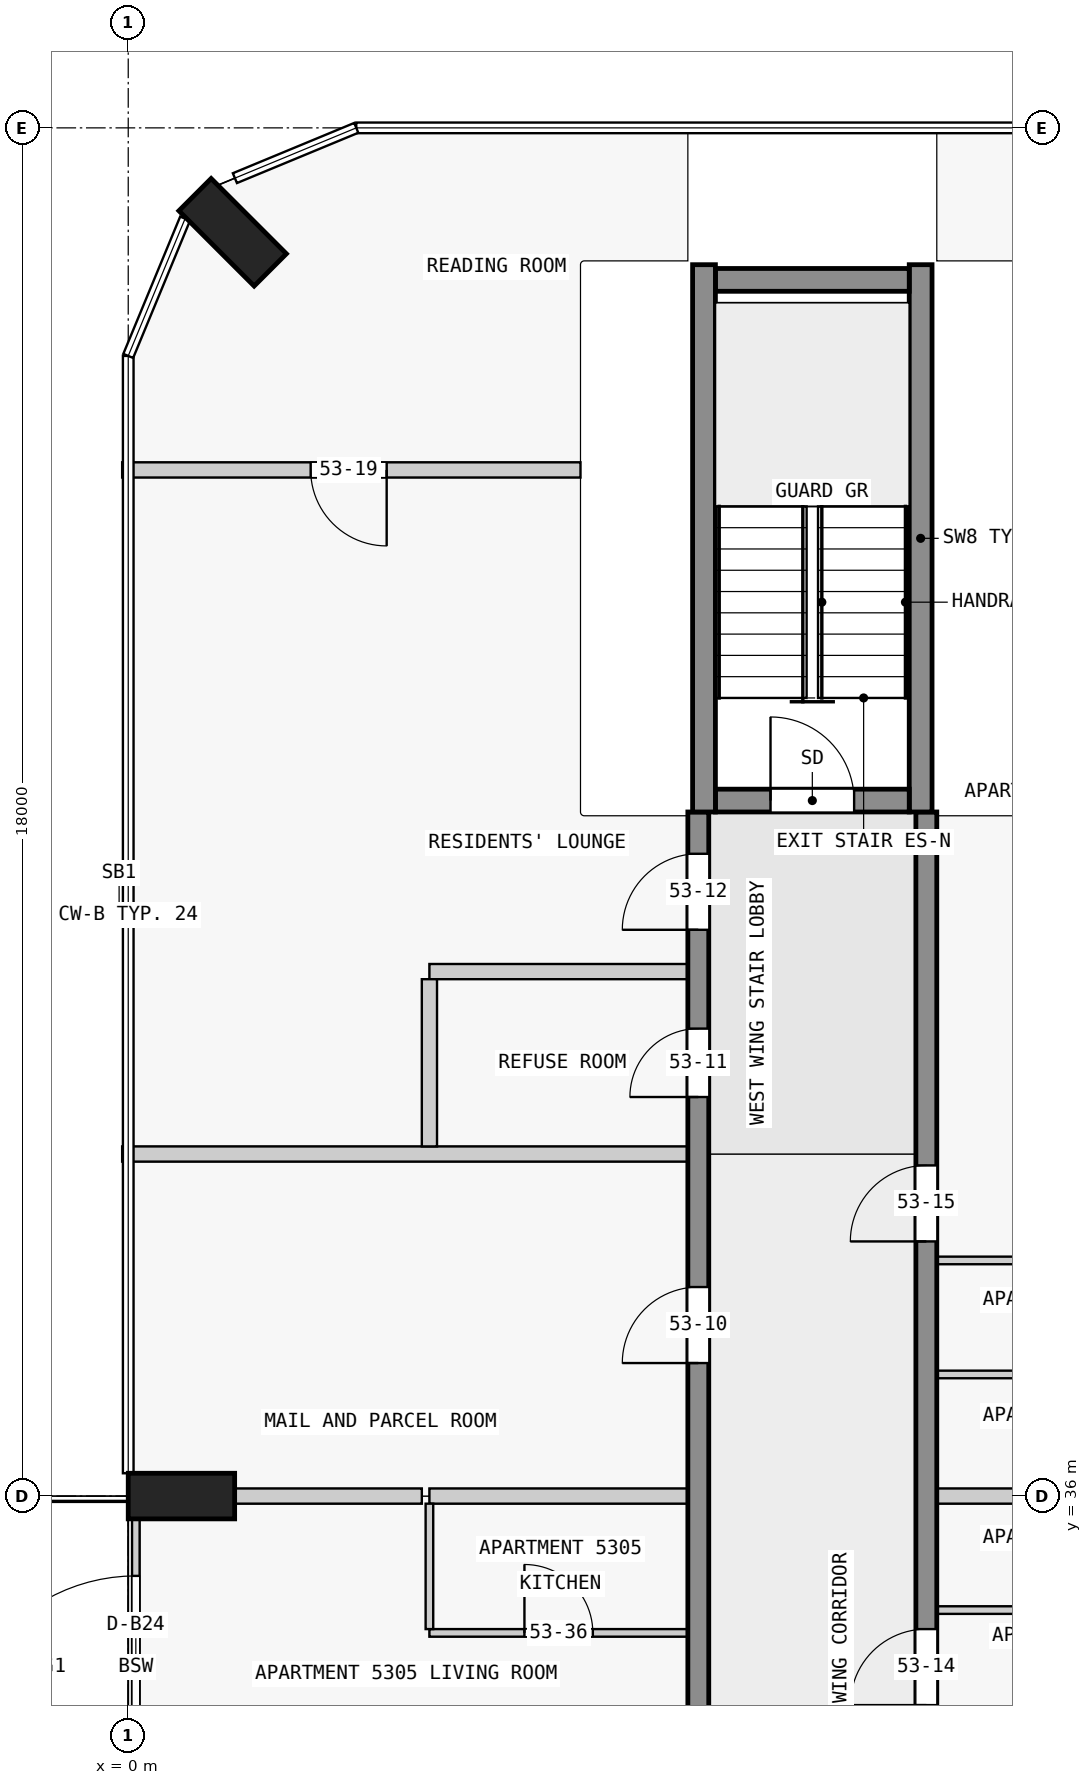
"""IFC4 building model, lengths in metres.
Left out: names, types, materials, properties, quantities, classifications, styles, units other than length and angle.
Written with IfcOpenShell. Run it as: python <this file> out.ifc"""

import sys

from ifc_helpers import new_model, si_unit, direction, frame, frame_2d, origin, origin_2d, place, context, subcontext, project, spatial, rectangle, extrude, element, fill, save


model = new_model("IFC4")
c1 = context("Model", 3, precision=1e-05, world=origin(), true_north=direction((0.0, 1.0)))
c2 = subcontext(c1, "Body", "Model", "MODEL_VIEW")
j1 = project(units=[si_unit("LENGTHUNIT", "METRE"), si_unit("PLANEANGLEUNIT", "RADIAN")], contexts=[c1])
p1 = place(None, origin())
s1 = spatial("IfcSite", under=j1, at=p1, CompositionType="ELEMENT")
p2 = place(p1, origin())
s2 = spatial("IfcBuilding", under=s1, at=p2, CompositionType="ELEMENT")
p3 = place(p2, frame((0.0, 0.0, 204.9)))
s3 = spatial("IfcBuildingStorey", under=s2, at=p3, CompositionType="ELEMENT", Elevation=204.9)
for number, where, z_axis, x_axis in (
    (1, (1.374, 52.626, 0.0), (0.0, 0.0, 1.0), (0.707, 0.707, 0.0)),
    (2, (0.7, 36.0, 0.0), (0.0, 0.0, 1.0), (0.0, 1.0, 0.0)),
):
    element("IfcColumn", number, at=place(p3, frame(where, z_axis=z_axis, x_axis=x_axis)), inside=s3, PredefinedType="COLUMN", context=c2, shape_type="SweptSolid", body=[
        extrude(rectangle(XDim=0.6, YDim=1.4, at=origin_2d()), origin(), (0.0, 0.0, 1.0), 3.5),
    ])
p4 = place(p3, frame((7.725, 45.15, 0.0), z_axis=(0.0, 0.0, 1.0), x_axis=(1.0, 0.0, 0.0)))
e3 = element("IfcWall", 3, at=p4, inside=s3, PredefinedType="SHEAR", context=c2, shape_type="SweptSolid", body=[
    extrude(rectangle(XDim=2.55, YDim=0.3, at=frame_2d((1.275, 0.0))), origin(), (0.0, 0.0, 1.0), 3.5),
])
p5 = place(p4, frame((0.725, 0.0, 0.0)))
e4 = element("IfcOpeningElement", 4, at=p5, cuts=e3, PredefinedType="OPENING", context=c2, shape_type="SweptSolid", body=[
    extrude(rectangle(XDim=1.1, YDim=2.1, at=frame_2d((0.55, 1.05))), frame((0.0, 0.16, 0.0), z_axis=(0.0, -1.0, 0.0), x_axis=(1.0, 0.0, 0.0)), (0.0, 0.0, 1.0), 0.32),
])
p6 = place(p3, frame((7.725, 52.0, 0.0), z_axis=(0.0, 0.0, 1.0), x_axis=(1.0, 0.0, 0.0)))
e5 = element("IfcWall", 5, at=p6, inside=s3, PredefinedType="SHEAR", context=c2, shape_type="SweptSolid", body=[
    extrude(rectangle(XDim=2.55, YDim=0.3, at=frame_2d((1.275, 0.0))), origin(), (0.0, 0.0, 1.0), 3.5),
])
for number, where, z_axis, x_axis in (
    (6, (7.575, 45.0, 0.0), (0.0, 0.0, 1.0), (0.0, 1.0, 0.0)),
    (7, (10.425, 45.0, 0.0), (0.0, 0.0, 1.0), (0.0, 1.0, 0.0)),
):
    element("IfcWall", number, at=place(p3, frame(where, z_axis=z_axis, x_axis=x_axis)), inside=s3, PredefinedType="SHEAR", context=c2, shape_type="SweptSolid", body=[
        extrude(rectangle(XDim=7.2, YDim=0.3, at=frame_2d((3.6, 0.0))), origin(), (0.0, 0.0, 1.0), 3.5),
    ])
p7 = place(p3, frame((7.5, 18.0, 0.0), z_axis=(0.0, 0.0, 1.0), x_axis=(0.0, 1.0, 0.0)))
e8 = element("IfcWall", 8, at=p7, inside=s3, PredefinedType="SHEAR", context=c2, shape_type="SweptSolid", body=[
    extrude(rectangle(XDim=27.0, YDim=0.275, at=frame_2d((13.5, 0.0))), origin(), (0.0, 0.0, 1.0), 3.25),
])
p8 = place(p7, frame((1.75, 0.0, 0.0)))
e9 = element("IfcOpeningElement", 9, at=p8, cuts=e8, PredefinedType="OPENING", context=c2, shape_type="SweptSolid", body=[
    extrude(rectangle(XDim=1.0, YDim=2.1, at=frame_2d((0.5, 1.05))), frame((0.0, 0.147, 0.0), z_axis=(0.0, -1.0, 0.0), x_axis=(1.0, 0.0, 0.0)), (0.0, 0.0, 1.0), 0.295),
])
p9 = place(p7, frame((5.85, 0.0, 0.0)))
e10 = element("IfcOpeningElement", 10, at=p9, cuts=e8, PredefinedType="OPENING", context=c2, shape_type="SweptSolid", body=[
    extrude(rectangle(XDim=1.8, YDim=2.1, at=frame_2d((0.9, 1.05))), frame((0.0, 0.147, 0.0), z_axis=(0.0, -1.0, 0.0), x_axis=(1.0, 0.0, 0.0)), (0.0, 0.0, 1.0), 0.295),
])
p10 = place(p7, frame((13.05, 0.0, 0.0)))
e11 = element("IfcOpeningElement", 11, at=p10, cuts=e8, PredefinedType="OPENING", context=c2, shape_type="SweptSolid", body=[
    extrude(rectangle(XDim=1.0, YDim=2.1, at=frame_2d((0.5, 1.05))), frame((0.0, 0.147, 0.0), z_axis=(0.0, -1.0, 0.0), x_axis=(1.0, 0.0, 0.0)), (0.0, 0.0, 1.0), 0.295),
])
p11 = place(p7, frame((19.75, 0.0, 0.0)))
e12 = element("IfcOpeningElement", 12, at=p11, cuts=e8, PredefinedType="OPENING", context=c2, shape_type="SweptSolid", body=[
    extrude(rectangle(XDim=1.0, YDim=2.1, at=frame_2d((0.5, 1.05))), frame((0.0, 0.147, 0.0), z_axis=(0.0, -1.0, 0.0), x_axis=(1.0, 0.0, 0.0)), (0.0, 0.0, 1.0), 0.295),
])
p12 = place(p7, frame((23.25, 0.0, 0.0)))
e13 = element("IfcOpeningElement", 13, at=p12, cuts=e8, PredefinedType="OPENING", context=c2, shape_type="SweptSolid", body=[
    extrude(rectangle(XDim=0.9, YDim=2.1, at=frame_2d((0.45, 1.05))), frame((0.0, 0.147, 0.0), z_axis=(0.0, -1.0, 0.0), x_axis=(1.0, 0.0, 0.0)), (0.0, 0.0, 1.0), 0.295),
])
p13 = place(p7, frame((25.45, 0.0, 0.0)))
e14 = element("IfcOpeningElement", 14, at=p13, cuts=e8, PredefinedType="OPENING", context=c2, shape_type="SweptSolid", body=[
    extrude(rectangle(XDim=1.0, YDim=2.1, at=frame_2d((0.5, 1.05))), frame((0.0, 0.147, 0.0), z_axis=(0.0, -1.0, 0.0), x_axis=(1.0, 0.0, 0.0)), (0.0, 0.0, 1.0), 0.295),
])
p14 = place(p3, frame((10.5, 18.0, 0.0), z_axis=(0.0, 0.0, 1.0), x_axis=(0.0, 1.0, 0.0)))
e15 = element("IfcWall", 15, at=p14, inside=s3, PredefinedType="SHEAR", context=c2, shape_type="SweptSolid", body=[
    extrude(rectangle(XDim=27.0, YDim=0.275, at=frame_2d((13.5, 0.0))), origin(), (0.0, 0.0, 1.0), 3.25),
])
p15 = place(p14, frame((4.85, 0.0, 0.0)))
e16 = element("IfcOpeningElement", 16, at=p15, cuts=e15, PredefinedType="OPENING", context=c2, shape_type="SweptSolid", body=[
    extrude(rectangle(XDim=1.0, YDim=2.1, at=frame_2d((0.5, 1.05))), frame((0.0, 0.147, 0.0), z_axis=(0.0, -1.0, 0.0), x_axis=(1.0, 0.0, 0.0)), (0.0, 0.0, 1.0), 0.295),
])
p16 = place(p14, frame((15.25, 0.0, 0.0)))
e17 = element("IfcOpeningElement", 17, at=p16, cuts=e15, PredefinedType="OPENING", context=c2, shape_type="SweptSolid", body=[
    extrude(rectangle(XDim=1.0, YDim=2.1, at=frame_2d((0.5, 1.05))), frame((0.0, 0.147, 0.0), z_axis=(0.0, -1.0, 0.0), x_axis=(1.0, 0.0, 0.0)), (0.0, 0.0, 1.0), 0.295),
])
p17 = place(p14, frame((21.35, 0.0, 0.0)))
e18 = element("IfcOpeningElement", 18, at=p17, cuts=e15, PredefinedType="OPENING", context=c2, shape_type="SweptSolid", body=[
    extrude(rectangle(XDim=1.0, YDim=2.1, at=frame_2d((0.5, 1.05))), frame((0.0, 0.147, 0.0), z_axis=(0.0, -1.0, 0.0), x_axis=(1.0, 0.0, 0.0)), (0.0, 0.0, 1.0), 0.295),
])
p18 = place(p3, frame((0.1, 31.5, 0.0), z_axis=(0.0, 0.0, 1.0), x_axis=(0.0, 1.0, 0.0)))
e19 = element("IfcWall", 19, at=p18, inside=s3, PredefinedType="STANDARD", context=c2, shape_type="SweptSolid", body=[
    extrude(rectangle(XDim=4.5, YDim=0.1, at=frame_2d((2.25, 0.0))), origin(), (0.0, 0.0, 1.0), 3.25),
])
p19 = place(p18, frame((1.05, 0.0, 0.0)))
e20 = element("IfcOpeningElement", 20, at=p19, cuts=e19, PredefinedType="OPENING", context=c2, shape_type="SweptSolid", body=[
    extrude(rectangle(XDim=2.4, YDim=2.4, at=frame_2d((1.2, 1.2))), frame((0.0, 0.06, 0.0), z_axis=(0.0, -1.0, 0.0), x_axis=(1.0, 0.0, 0.0)), (0.0, 0.0, 1.0), 0.12),
])
p20 = place(p3, frame((3.962, 34.2, 0.0), z_axis=(0.0, 0.0, 1.0), x_axis=(1.0, 0.0, 0.0)))
e21 = element("IfcWall", 21, at=p20, inside=s3, PredefinedType="PARTITIONING", context=c2, shape_type="SweptSolid", body=[
    extrude(rectangle(XDim=3.4, YDim=0.1, at=frame_2d((1.7, 0.0))), origin(), (0.0, 0.0, 1.0), 3.25),
])
p21 = place(p20, frame((1.25, 0.0, 0.0)))
e22 = element("IfcOpeningElement", 22, at=p21, cuts=e21, PredefinedType="OPENING", context=c2, shape_type="SweptSolid", body=[
    extrude(rectangle(XDim=0.9, YDim=2.1, at=frame_2d((0.45, 1.05))), frame((0.0, 0.06, 0.0), z_axis=(0.0, -1.0, 0.0), x_axis=(1.0, 0.0, 0.0)), (0.0, 0.0, 1.0), 0.12),
])
p22 = place(p3, frame((10.637, 34.5, 0.0), z_axis=(0.0, 0.0, 1.0), x_axis=(1.0, 0.0, 0.0)))
e23 = element("IfcWall", 23, at=p22, inside=s3, PredefinedType="PARTITIONING", context=c2, shape_type="SweptSolid", body=[
    extrude(rectangle(XDim=3.35, YDim=0.1, at=frame_2d((1.675, 0.0))), origin(), (0.0, 0.0, 1.0), 3.25),
])
p23 = place(p22, frame((1.25, 0.0, 0.0)))
e24 = element("IfcOpeningElement", 24, at=p23, cuts=e23, PredefinedType="OPENING", context=c2, shape_type="SweptSolid", body=[
    extrude(rectangle(XDim=0.9, YDim=2.1, at=frame_2d((0.45, 1.05))), frame((0.0, 0.06, 0.0), z_axis=(0.0, -1.0, 0.0), x_axis=(1.0, 0.0, 0.0)), (0.0, 0.0, 1.0), 0.12),
])
for number, where, z_axis, x_axis in (
    (25, (7.363, 36.0, 0.0), (0.0, 0.0, 1.0), (-1.0, 0.0, 0.0)),
    (26, (14.038, 36.0, 0.0), (0.0, 0.0, 1.0), (-1.0, 0.0, 0.0)),
):
    element("IfcWall", number, at=place(p3, frame(where, z_axis=z_axis, x_axis=x_axis)), inside=s3, PredefinedType="PARTITIONING", context=c2, shape_type="SweptSolid", body=[
        extrude(rectangle(XDim=3.4, YDim=0.2, at=frame_2d((1.7, 0.0))), origin(), (0.0, 0.0, 1.0), 3.25),
    ])
p24 = place(p3, frame((1.4, 36.0, 0.0), z_axis=(0.0, 0.0, 1.0), x_axis=(1.0, 0.0, 0.0)))
e27 = element("IfcWall", 27, at=p24, inside=s3, PredefinedType="PARTITIONING", context=c2, shape_type="SweptSolid", body=[
    extrude(rectangle(XDim=2.463, YDim=0.2, at=frame_2d((1.231, 0.0))), origin(), (0.0, 0.0, 1.0), 3.25),
])
p25 = place(p3, frame((13.988, 37.6, 0.0), z_axis=(0.0, 0.0, 1.0), x_axis=(-1.0, 0.0, 0.0)))
e28 = element("IfcWall", 28, at=p25, inside=s3, PredefinedType="PARTITIONING", context=c2, shape_type="SweptSolid", body=[
    extrude(rectangle(XDim=3.35, YDim=0.1, at=frame_2d((1.675, 0.0))), origin(), (0.0, 0.0, 1.0), 3.25),
])
p26 = place(p3, frame((13.988, 39.1, 0.0), z_axis=(0.0, 0.0, 1.0), x_axis=(-1.0, 0.0, 0.0)))
e29 = element("IfcWall", 29, at=p26, inside=s3, PredefinedType="PARTITIONING", context=c2, shape_type="SweptSolid", body=[
    extrude(rectangle(XDim=3.35, YDim=0.1, at=frame_2d((1.675, 0.0))), origin(), (0.0, 0.0, 1.0), 3.25),
])
p27 = place(p26, frame((1.25, 0.0, 0.0)))
e30 = element("IfcOpeningElement", 30, at=p27, cuts=e29, PredefinedType="OPENING", context=c2, shape_type="SweptSolid", body=[
    extrude(rectangle(XDim=0.9, YDim=2.1, at=frame_2d((0.45, 1.05))), frame((0.0, 0.06, 0.0), z_axis=(0.0, -1.0, 0.0), x_axis=(1.0, 0.0, 0.0)), (0.0, 0.0, 1.0), 0.12),
])
p28 = place(p3, frame((7.363, 40.5, 0.0), z_axis=(0.0, 0.0, 1.0), x_axis=(-1.0, 0.0, 0.0)))
e31 = element("IfcWall", 31, at=p28, inside=s3, PredefinedType="PARTITIONING", context=c2, shape_type="SweptSolid", body=[
    extrude(rectangle(XDim=7.443, YDim=0.2, at=frame_2d((3.721, 0.0))), origin(), (0.0, 0.0, 1.0), 3.25),
])
p29 = place(p3, frame((7.363, 42.9, 0.0), z_axis=(0.0, 0.0, 1.0), x_axis=(-1.0, 0.0, 0.0)))
e32 = element("IfcWall", 32, at=p29, inside=s3, PredefinedType="PARTITIONING", context=c2, shape_type="SweptSolid", body=[
    extrude(rectangle(XDim=3.4, YDim=0.2, at=frame_2d((1.7, 0.0))), origin(), (0.0, 0.0, 1.0), 3.25),
])
p30 = place(p3, frame((5.95, 49.5, 0.0), z_axis=(0.0, 0.0, 1.0), x_axis=(-1.0, 0.0, 0.0)))
e33 = element("IfcWall", 33, at=p30, inside=s3, PredefinedType="PARTITIONING", context=c2, shape_type="SweptSolid", body=[
    extrude(rectangle(XDim=6.03, YDim=0.2, at=frame_2d((3.015, 0.0))), origin(), (0.0, 0.0, 1.0), 3.25),
])
p31 = place(p30, frame((2.55, 0.0, 0.0)))
e34 = element("IfcOpeningElement", 34, at=p31, cuts=e33, PredefinedType="OPENING", context=c2, shape_type="SweptSolid", body=[
    extrude(rectangle(XDim=1.0, YDim=2.1, at=frame_2d((0.5, 1.05))), frame((0.0, 0.11, 0.0), z_axis=(0.0, -1.0, 0.0), x_axis=(1.0, 0.0, 0.0)), (0.0, 0.0, 1.0), 0.22),
])
p32 = place(p3, frame((3.962, 35.9, 0.0), z_axis=(0.0, 0.0, 1.0), x_axis=(0.0, -1.0, 0.0)))
e35 = element("IfcWall", 35, at=p32, inside=s3, PredefinedType="PARTITIONING", context=c2, shape_type="SweptSolid", body=[
    extrude(rectangle(XDim=1.65, YDim=0.1, at=frame_2d((0.825, 0.0))), origin(), (0.0, 0.0, 1.0), 3.25),
])
p33 = place(p3, frame((3.962, 42.8, 0.0), z_axis=(0.0, 0.0, 1.0), x_axis=(0.0, -1.0, 0.0)))
e36 = element("IfcWall", 36, at=p33, inside=s3, PredefinedType="PARTITIONING", context=c2, shape_type="SweptSolid", body=[
    extrude(rectangle(XDim=2.2, YDim=0.2, at=frame_2d((1.1, 0.0))), origin(), (0.0, 0.0, 1.0), 3.25),
])
p34 = place(p19, origin())
e37 = element("IfcDoor", 37, at=p34, inside=s3, OperationType="SINGLE_SWING_LEFT", PredefinedType="DOOR", context=c2, shape_type="SweptSolid", body=[
    extrude(rectangle(XDim=2.4, YDim=2.4, at=frame_2d((1.2, 1.2))), frame((0.0, 0.025, 0.0), z_axis=(0.0, -1.0, 0.0), x_axis=(1.0, 0.0, 0.0)), (0.0, 0.0, 1.0), 0.05),
])
fill(e20, e37)
p35 = place(p5, origin())
e38 = element("IfcDoor", 38, at=p35, inside=s3, OperationType="SINGLE_SWING_LEFT", PredefinedType="DOOR", context=c2, shape_type="SweptSolid", body=[
    extrude(rectangle(XDim=1.1, YDim=2.1, at=frame_2d((0.55, 1.05))), frame((0.0, 0.025, 0.0), z_axis=(0.0, -1.0, 0.0), x_axis=(1.0, 0.0, 0.0)), (0.0, 0.0, 1.0), 0.05),
])
fill(e4, e38)
p36 = place(p11, origin())
e39 = element("IfcDoor", 39, at=p36, inside=s3, OperationType="SINGLE_SWING_RIGHT", PredefinedType="DOOR", context=c2, shape_type="SweptSolid", body=[
    extrude(rectangle(XDim=1.0, YDim=2.1, at=frame_2d((0.5, 1.05))), frame((0.0, 0.025, 0.0), z_axis=(0.0, -1.0, 0.0), x_axis=(1.0, 0.0, 0.0)), (0.0, 0.0, 1.0), 0.05),
])
fill(e12, e39)
p37 = place(p12, origin())
e40 = element("IfcDoor", 40, at=p37, inside=s3, OperationType="SINGLE_SWING_RIGHT", PredefinedType="DOOR", context=c2, shape_type="SweptSolid", body=[
    extrude(rectangle(XDim=0.9, YDim=2.1, at=frame_2d((0.45, 1.05))), frame((0.0, 0.025, 0.0), z_axis=(0.0, -1.0, 0.0), x_axis=(1.0, 0.0, 0.0)), (0.0, 0.0, 1.0), 0.05),
])
fill(e13, e40)
p38 = place(p13, origin())
e41 = element("IfcDoor", 41, at=p38, inside=s3, OperationType="SINGLE_SWING_RIGHT", PredefinedType="DOOR", context=c2, shape_type="SweptSolid", body=[
    extrude(rectangle(XDim=1.0, YDim=2.1, at=frame_2d((0.5, 1.05))), frame((0.0, 0.025, 0.0), z_axis=(0.0, -1.0, 0.0), x_axis=(1.0, 0.0, 0.0)), (0.0, 0.0, 1.0), 0.05),
])
fill(e14, e41)
p39 = place(p16, origin())
e42 = element("IfcDoor", 42, at=p39, inside=s3, OperationType="SINGLE_SWING_RIGHT", PredefinedType="DOOR", context=c2, shape_type="SweptSolid", body=[
    extrude(rectangle(XDim=1.0, YDim=2.1, at=frame_2d((0.5, 1.05))), frame((0.0, 0.025, 0.0), z_axis=(0.0, -1.0, 0.0), x_axis=(1.0, 0.0, 0.0)), (0.0, 0.0, 1.0), 0.05),
])
fill(e17, e42)
p40 = place(p17, origin())
e43 = element("IfcDoor", 43, at=p40, inside=s3, OperationType="SINGLE_SWING_RIGHT", PredefinedType="DOOR", context=c2, shape_type="SweptSolid", body=[
    extrude(rectangle(XDim=1.0, YDim=2.1, at=frame_2d((0.5, 1.05))), frame((0.0, 0.025, 0.0), z_axis=(0.0, -1.0, 0.0), x_axis=(1.0, 0.0, 0.0)), (0.0, 0.0, 1.0), 0.05),
])
fill(e18, e43)
p41 = place(p31, origin())
e44 = element("IfcDoor", 44, at=p41, inside=s3, OperationType="SINGLE_SWING_RIGHT", PredefinedType="DOOR", context=c2, shape_type="SweptSolid", body=[
    extrude(rectangle(XDim=1.0, YDim=2.1, at=frame_2d((0.5, 1.05))), frame((0.0, 0.025, 0.0), z_axis=(0.0, -1.0, 0.0), x_axis=(1.0, 0.0, 0.0)), (0.0, 0.0, 1.0), 0.05),
])
fill(e34, e44)
p42 = place(p21, origin())
e45 = element("IfcDoor", 45, at=p42, inside=s3, OperationType="SINGLE_SWING_LEFT", PredefinedType="DOOR", context=c2, shape_type="SweptSolid", body=[
    extrude(rectangle(XDim=0.9, YDim=2.1, at=frame_2d((0.45, 1.05))), frame((0.0, 0.025, 0.0), z_axis=(0.0, -1.0, 0.0), x_axis=(1.0, 0.0, 0.0)), (0.0, 0.0, 1.0), 0.05),
])
fill(e22, e45)
save(model, sys.argv[1])
